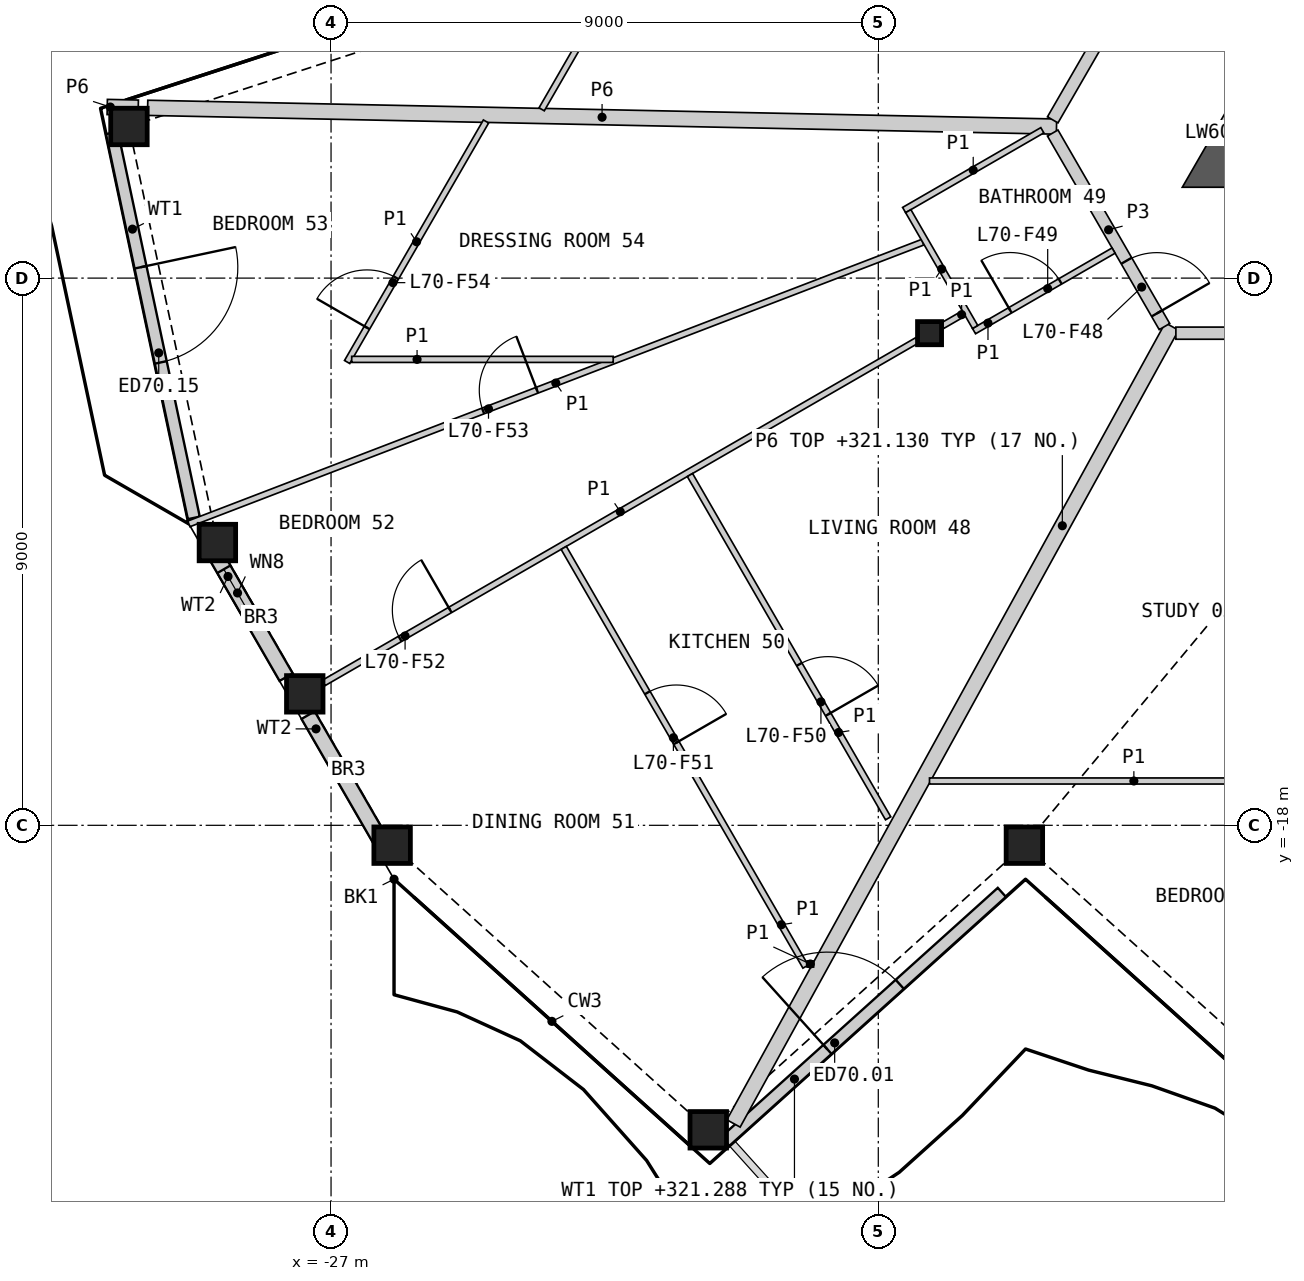
"""IFC4 building model, lengths in metres.
Left out: names, types, materials, properties, quantities, classifications, styles, units other than length and angle.
Written with IfcOpenShell. Run it as: python <this file> out.ifc"""

import sys

from ifc_helpers import new_model, si_unit, direction, frame, frame_2d, origin, origin_2d, place, context, subcontext, project, spatial, polyline, rectangle, hollow_rectangle, i_section, outline, extrude, element, fill, save


model = new_model("IFC4")
c1 = context("Model", 3, precision=1e-05, world=origin(), true_north=direction((0.0, 1.0)))
c2 = subcontext(c1, "Body", "Model", "MODEL_VIEW")
j1 = project(units=[si_unit("LENGTHUNIT", "METRE"), si_unit("PLANEANGLEUNIT", "RADIAN")], contexts=[c1])
p1 = place(None, origin())
s1 = spatial("IfcSite", under=j1, at=p1, CompositionType="ELEMENT")
p2 = place(p1, origin())
s2 = spatial("IfcBuilding", under=s1, at=p2, CompositionType="ELEMENT")
p3 = place(p2, frame((0.0, 0.0, 318.8)))
s3 = spatial("IfcBuildingStorey", under=s2, at=p3, CompositionType="ELEMENT", Elevation=318.8)
for number, where, z_axis, x_axis in (
    (1, (-25.995, -18.327, 0.0), (0.0, 0.0, 1.0), (1.0, 0.0, 0.0)),
    (2, (-20.796, -23.008, 0.0), (0.0, 0.0, 1.0), (1.0, 0.0, 0.0)),
    (3, (-15.597, -18.327, 0.0), (0.0, 0.0, 1.0), (1.0, 0.0, 0.0)),
    (4, (-30.324, -6.506, 0.0), (0.0, 0.0, 1.0), (1.0, 0.0, 0.0)),
    (5, (-28.869, -13.349, 0.0), (0.0, 0.0, 1.0), (1.0, 0.0, 0.0)),
    (6, (-27.432, -15.838, 0.0), (0.0, 0.0, 1.0), (1.0, 0.0, 0.0)),
):
    element("IfcColumn", number, at=place(p3, frame(where, z_axis=z_axis, x_axis=x_axis)), inside=s3, PredefinedType="COLUMN", context=c2, shape_type="SweptSolid", body=[
        extrude(hollow_rectangle(XDim=0.6, YDim=0.6, WallThickness=0.04, at=origin_2d()), origin(), (0.0, 0.0, 1.0), 3.4),
    ])
p4 = place(p3, frame((-17.157, -9.906, 0.0), z_axis=(0.0, 0.0, 1.0), x_axis=(1.0, 0.0, 0.0)))
e7 = element("IfcColumn", 7, at=p4, inside=s3, PredefinedType="COLUMN", context=c2, shape_type="SweptSolid", body=[
    extrude(i_section(OverallWidth=0.396, OverallDepth=0.381, WebThickness=0.019, FlangeThickness=0.03, at=origin_2d()), origin(), (0.0, 0.0, 1.0), 3.4),
])
p5 = place(p3, frame((-20.516, -23.198, 0.0), z_axis=(0.0, 0.0, 1.0), x_axis=(0.743121537674, 0.66915646918, 0.0)))
e8 = element("IfcWall", 8, at=p5, inside=s3, PredefinedType="SOLIDWALL", context=c2, shape_type="SweptSolid", body=[
    extrude(rectangle(XDim=6.12, YDim=0.2, at=frame_2d((3.06, 0.0))), origin(), (0.0, 0.0, 1.0), 2.488),
])
p6 = place(p5, frame((2.26, 0.0, 0.0)))
e9 = element("IfcOpeningElement", 9, at=p6, cuts=e8, PredefinedType="OPENING", context=c2, shape_type="SweptSolid", body=[
    extrude(rectangle(XDim=1.6, YDim=2.25, at=frame_2d((0.8, 1.125))), frame((0.0, 0.11, 0.0), z_axis=(0.0, -1.0, 0.0), x_axis=(1.0, 0.0, 0.0)), (0.0, 0.0, 1.0), 0.22),
])
p7 = place(p3, frame((-30.603, -6.611, 0.0), z_axis=(0.0, 0.0, 1.0), x_axis=(0.207921893309, -0.978145432072, 0.0)))
e10 = element("IfcWall", 10, at=p7, inside=s3, PredefinedType="SOLIDWALL", context=c2, shape_type="SweptSolid", body=[
    extrude(rectangle(XDim=6.475, YDim=0.2, at=frame_2d((3.237, 0.0))), origin(), (0.0, 0.0, 1.0), 2.488),
])
p8 = place(p7, frame((2.26, 0.0, 0.0)))
e11 = element("IfcOpeningElement", 11, at=p8, cuts=e10, PredefinedType="OPENING", context=c2, shape_type="SweptSolid", body=[
    extrude(rectangle(XDim=1.6, YDim=2.25, at=frame_2d((0.8, 1.125))), frame((0.0, 0.11, 0.0), z_axis=(0.0, -1.0, 0.0), x_axis=(1.0, 0.0, 0.0)), (0.0, 0.0, 1.0), 0.22),
])
p9 = place(p3, frame((-29.013, -13.356, 0.0), z_axis=(0.0, 0.0, 1.0), x_axis=(0.500012659481, -0.866018094706, 0.0)))
e12 = element("IfcWall", 12, at=p9, inside=s3, PredefinedType="SOLIDWALL", context=c2, shape_type="SweptSolid", body=[
    extrude(rectangle(XDim=2.549, YDim=0.25, at=frame_2d((1.274, 0.0))), origin(), (0.0, 0.0, 1.0), 2.488),
])
p10 = place(p9, frame((0.5, 0.0, 1.5)))
e13 = element("IfcOpeningElement", 13, at=p10, cuts=e12, PredefinedType="OPENING", context=c2, shape_type="SweptSolid", body=[
    extrude(rectangle(XDim=0.9, YDim=0.7, at=frame_2d((0.45, 0.35))), frame((0.0, 0.135, 0.0), z_axis=(0.0, -1.0, 0.0), x_axis=(1.0, 0.0, 0.0)), (0.0, 0.0, 1.0), 0.27),
])
p11 = place(p3, frame((-27.378, -16.188, 0.0), z_axis=(0.0, 0.0, 1.0), x_axis=(0.499992367345, -0.866029810455, 0.0)))
e14 = element("IfcWall", 14, at=p11, inside=s3, PredefinedType="SOLIDWALL", context=c2, shape_type="SweptSolid", body=[
    extrude(rectangle(XDim=2.61, YDim=0.25, at=frame_2d((1.305, 0.0))), origin(), (0.0, 0.0, 1.0), 2.488),
])
p12 = place(p3, origin())
e15 = element("IfcWall", 15, at=p12, inside=s3, PredefinedType="SHEAR", context=c2, shape_type="SweptSolid", body=[
    extrude(outline(polyline([(-12.48, -6.606), (-11.961, -6.906), (-11.961, -7.506), (-13.0, -7.506), (-12.48, -6.606)])), origin(), (0.0, 0.0, 1.0), 3.1),
])
p13 = place(p3, frame((-10.925, -4.511, 0.0), z_axis=(0.0, 0.0, 1.0), x_axis=(-0.500018667571, -0.866014625789, 0.0)))
e16 = element("IfcWall", 16, at=p13, inside=s3, PredefinedType="SHEAR", context=c2, shape_type="SweptSolid", body=[
    extrude(rectangle(XDim=2.592, YDim=0.6, at=frame_2d((1.296, 0.0))), origin(), (0.0, 0.0, 1.0), 3.1),
])
p14 = place(p13, frame((0.6, 0.0, 0.0)))
e17 = element("IfcOpeningElement", 17, at=p14, cuts=e16, PredefinedType="OPENING", context=c2, shape_type="SweptSolid", body=[
    extrude(rectangle(XDim=1.0, YDim=2.1, at=frame_2d((0.5, 1.05))), frame((0.0, 0.31, 0.0), z_axis=(0.0, -1.0, 0.0), x_axis=(1.0, 0.0, 0.0)), (0.0, 0.0, 1.0), 0.62),
])
p15 = place(p3, frame((-20.381, -22.904, 0.0), z_axis=(0.0, 0.0, 1.0), x_axis=(0.481994550341, 0.876174214093, 0.0)))
e18 = element("IfcWall", 18, at=p15, inside=s3, PredefinedType="PARTITIONING", context=c2, shape_type="SweptSolid", body=[
    extrude(rectangle(XDim=14.96, YDim=0.25, at=frame_2d((7.48, 0.0))), origin(), (0.0, 0.0, 1.0), 2.33),
])
p16 = place(p3, frame((-30.016, -6.199, 0.0), z_axis=(0.0, 0.0, 1.0), x_axis=(0.999786619639, -0.02065708573, 0.0)))
e19 = element("IfcWall", 19, at=p16, inside=s3, PredefinedType="PARTITIONING", context=c2, shape_type="SweptSolid", body=[
    extrude(rectangle(XDim=14.951, YDim=0.25, at=frame_2d((7.475, 0.0))), origin(), (0.0, 0.0, 1.0), 2.33),
])
p17 = place(p3, frame((-13.106, -9.906, 0.0), z_axis=(0.0, 0.0, 1.0), x_axis=(1.0, 0.0, 0.0)))
e20 = element("IfcWall", 20, at=p17, inside=s3, PredefinedType="PARTITIONING", context=c2, shape_type="SweptSolid", body=[
    extrude(rectangle(XDim=4.32, YDim=0.2, at=frame_2d((2.16, 0.0))), origin(), (0.0, 0.0, 1.0), 3.1),
])
p18 = place(p3, frame((-15.131, -6.397, 0.0), z_axis=(0.0, 0.0, 1.0), x_axis=(0.500003406062, 0.866023437285, 0.0)))
e21 = element("IfcWall", 21, at=p18, inside=s3, PredefinedType="PARTITIONING", context=c2, shape_type="SweptSolid", body=[
    extrude(rectangle(XDim=4.288, YDim=0.2, at=frame_2d((2.144, 0.0))), origin(), (0.0, 0.0, 1.0), 3.1),
])
p19 = place(p3, frame((-15.131, -6.614, 0.0), z_axis=(0.0, 0.0, 1.0), x_axis=(0.499967746641, -0.866044024469, 0.0)))
e22 = element("IfcWall", 22, at=p19, inside=s3, PredefinedType="PARTITIONING", context=c2, shape_type="SweptSolid", body=[
    extrude(rectangle(XDim=3.676, YDim=0.2, at=frame_2d((1.838, 0.0))), origin(), (0.0, 0.0, 1.0), 3.1),
])
p20 = place(p19, frame((2.426, 0.0, 0.0)))
e23 = element("IfcOpeningElement", 23, at=p20, cuts=e22, PredefinedType="OPENING", context=c2, shape_type="SweptSolid", body=[
    extrude(rectangle(XDim=1.0, YDim=2.1, at=frame_2d((0.5, 1.05))), frame((0.0, 0.11, 0.0), z_axis=(0.0, -1.0, 0.0), x_axis=(1.0, 0.0, 0.0)), (0.0, 0.0, 1.0), 0.22),
])
p21 = place(p3, frame((-30.681, -6.186, 0.0), z_axis=(0.0, 0.0, 1.0), x_axis=(0.999788216533, -0.020579652135, 0.0)))
e24 = element("IfcWall", 24, at=p21, inside=s3, PredefinedType="PARTITIONING", context=c2, shape_type="SweptSolid", body=[
    extrude(rectangle(XDim=0.51, YDim=0.25, at=frame_2d((0.255, 0.0))), origin(), (0.0, 0.0, 1.0), 2.33),
])
p22 = place(p3, frame((-29.338, -13.042, 0.0), z_axis=(0.0, 0.0, 1.0), x_axis=(0.93358243931, 0.358362705944, 0.0)))
e25 = element("IfcWall", 25, at=p22, inside=s3, PredefinedType="PARTITIONING", context=c2, shape_type="SweptSolid", body=[
    extrude(rectangle(XDim=12.928, YDim=0.1, at=frame_2d((6.464, 0.0))), origin(), (0.0, 0.0, 1.0), 2.33),
])
p23 = place(p22, frame((5.183, 0.0, 0.0)))
e26 = element("IfcOpeningElement", 26, at=p23, cuts=e25, PredefinedType="OPENING", context=c2, shape_type="SweptSolid", body=[
    extrude(rectangle(XDim=0.95, YDim=2.1, at=frame_2d((0.475, 1.05))), frame((0.0, 0.06, 0.0), z_axis=(0.0, -1.0, 0.0), x_axis=(1.0, 0.0, 0.0)), (0.0, 0.0, 1.0), 0.12),
])
p24 = place(p3, frame((-27.122, -15.659, 0.0), z_axis=(0.0, 0.0, 1.0), x_axis=(0.866021046153, 0.500007547564, 0.0)))
e27 = element("IfcWall", 27, at=p24, inside=s3, PredefinedType="PARTITIONING", context=c2, shape_type="SweptSolid", body=[
    extrude(rectangle(XDim=11.267, YDim=0.1, at=frame_2d((5.634, 0.0))), origin(), (0.0, 0.0, 1.0), 2.33),
])
p25 = place(p24, frame((1.452, 0.0, 0.0)))
e28 = element("IfcOpeningElement", 28, at=p25, cuts=e27, PredefinedType="OPENING", context=c2, shape_type="SweptSolid", body=[
    extrude(rectangle(XDim=0.95, YDim=2.1, at=frame_2d((0.475, 1.05))), frame((0.0, 0.06, 0.0), z_axis=(0.0, -1.0, 0.0), x_axis=(1.0, 0.0, 0.0)), (0.0, 0.0, 1.0), 0.12),
])
p26 = place(p3, frame((-23.173, -13.437, 0.0), z_axis=(0.0, 0.0, 1.0), x_axis=(0.500018284498, -0.866014846967, 0.0)))
e29 = element("IfcWall", 29, at=p26, inside=s3, PredefinedType="PARTITIONING", context=c2, shape_type="SweptSolid", body=[
    extrude(rectangle(XDim=7.953, YDim=0.1, at=frame_2d((3.977, 0.0))), origin(), (0.0, 0.0, 1.0), 2.33),
])
p27 = place(p26, frame((2.751, 0.0, 0.0)))
e30 = element("IfcOpeningElement", 30, at=p27, cuts=e29, PredefinedType="OPENING", context=c2, shape_type="SweptSolid", body=[
    extrude(rectangle(XDim=0.95, YDim=2.1, at=frame_2d((0.475, 1.05))), frame((0.0, 0.06, 0.0), z_axis=(0.0, -1.0, 0.0), x_axis=(1.0, 0.0, 0.0)), (0.0, 0.0, 1.0), 0.12),
])
p28 = place(p3, frame((-23.536, -6.224, 0.0), z_axis=(0.0, 0.0, 1.0), x_axis=(0.500002256251, 0.866024101133, 0.0)))
e31 = element("IfcWall", 31, at=p28, inside=s3, PredefinedType="PARTITIONING", context=c2, shape_type="SweptSolid", body=[
    extrude(rectangle(XDim=6.722, YDim=0.1, at=frame_2d((3.361, 0.0))), origin(), (0.0, 0.0, 1.0), 2.33),
])
p29 = place(p28, frame((3.292, 0.0, 0.0)))
e32 = element("IfcOpeningElement", 32, at=p29, cuts=e31, PredefinedType="OPENING", context=c2, shape_type="SweptSolid", body=[
    extrude(rectangle(XDim=0.95, YDim=2.1, at=frame_2d((0.475, 1.05))), frame((0.0, 0.06, 0.0), z_axis=(0.0, -1.0, 0.0), x_axis=(1.0, 0.0, 0.0)), (0.0, 0.0, 1.0), 0.12),
])
p30 = place(p3, frame((-17.158, -17.271, 0.0), z_axis=(0.0, 0.0, 1.0), x_axis=(1.0, 0.0, 0.0)))
e33 = element("IfcWall", 33, at=p30, inside=s3, PredefinedType="PARTITIONING", context=c2, shape_type="SweptSolid", body=[
    extrude(rectangle(XDim=6.722, YDim=0.1, at=frame_2d((3.361, 0.0))), origin(), (0.0, 0.0, 1.0), 2.33),
])
p31 = place(p30, frame((5.015, 0.0, 0.0)))
e34 = element("IfcOpeningElement", 34, at=p31, cuts=e33, PredefinedType="OPENING", context=c2, shape_type="SweptSolid", body=[
    extrude(rectangle(XDim=0.95, YDim=2.1, at=frame_2d((0.475, 1.05))), frame((0.0, 0.06, 0.0), z_axis=(0.0, -1.0, 0.0), x_axis=(1.0, 0.0, 0.0)), (0.0, 0.0, 1.0), 0.12),
])
p32 = place(p3, frame((-21.098, -12.239, 0.0), z_axis=(0.0, 0.0, 1.0), x_axis=(0.499973122483, -0.86604092097, 0.0)))
e35 = element("IfcWall", 35, at=p32, inside=s3, PredefinedType="PARTITIONING", context=c2, shape_type="SweptSolid", body=[
    extrude(rectangle(XDim=6.52, YDim=0.1, at=frame_2d((3.26, 0.0))), origin(), (0.0, 0.0, 1.0), 2.33),
])
p33 = place(p32, frame((3.596, 0.0, 0.0)))
e36 = element("IfcOpeningElement", 36, at=p33, cuts=e35, PredefinedType="OPENING", context=c2, shape_type="SweptSolid", body=[
    extrude(rectangle(XDim=0.95, YDim=2.1, at=frame_2d((0.475, 1.05))), frame((0.0, 0.06, 0.0), z_axis=(0.0, -1.0, 0.0), x_axis=(1.0, 0.0, 0.0)), (0.0, 0.0, 1.0), 0.12),
])
p34 = place(p3, frame((-26.736, -10.38, 0.0), z_axis=(0.0, 0.0, 1.0), x_axis=(0.500024700597, 0.866011142419, 0.0)))
e37 = element("IfcWall", 37, at=p34, inside=s3, PredefinedType="PARTITIONING", context=c2, shape_type="SweptSolid", body=[
    extrude(rectangle(XDim=4.568, YDim=0.1, at=frame_2d((2.284, 0.0))), origin(), (0.0, 0.0, 1.0), 2.33),
])
p35 = place(p34, frame((0.652, 0.0, 0.0)))
e38 = element("IfcOpeningElement", 38, at=p35, cuts=e37, PredefinedType="OPENING", context=c2, shape_type="SweptSolid", body=[
    extrude(rectangle(XDim=0.95, YDim=2.1, at=frame_2d((0.475, 1.05))), frame((0.0, 0.06, 0.0), z_axis=(0.0, -1.0, 0.0), x_axis=(1.0, 0.0, 0.0)), (0.0, 0.0, 1.0), 0.12),
])
p36 = place(p3, frame((-26.66, -10.337, 0.0), z_axis=(0.0, 0.0, 1.0), x_axis=(1.0, 0.0, 0.0)))
e39 = element("IfcWall", 39, at=p36, inside=s3, PredefinedType="PARTITIONING", context=c2, shape_type="SweptSolid", body=[
    extrude(rectangle(XDim=4.301, YDim=0.1, at=frame_2d((2.15, 0.0))), origin(), (0.0, 0.0, 1.0), 2.33),
])
p37 = place(p3, frame((-17.575, -7.881, 0.0), z_axis=(0.0, 0.0, 1.0), x_axis=(0.866013657776, 0.500020344131, 0.0)))
e40 = element("IfcWall", 40, at=p37, inside=s3, PredefinedType="PARTITIONING", context=c2, shape_type="SweptSolid", body=[
    extrude(rectangle(XDim=2.625, YDim=0.1, at=frame_2d((1.312, 0.0))), origin(), (0.0, 0.0, 1.0), 2.33),
])
p38 = place(p3, frame((-16.426, -9.872, 0.0), z_axis=(0.0, 0.0, 1.0), x_axis=(0.866029095148, 0.499993606316, 0.0)))
e41 = element("IfcWall", 41, at=p38, inside=s3, PredefinedType="PARTITIONING", context=c2, shape_type="SweptSolid", body=[
    extrude(rectangle(XDim=2.65, YDim=0.1, at=frame_2d((1.325, 0.0))), origin(), (0.0, 0.0, 1.0), 2.33),
])
p39 = place(p38, frame((0.686, 0.0, 0.0)))
e42 = element("IfcOpeningElement", 42, at=p39, cuts=e41, PredefinedType="OPENING", context=c2, shape_type="SweptSolid", body=[
    extrude(rectangle(XDim=0.95, YDim=2.1, at=frame_2d((0.475, 1.05))), frame((0.0, 0.06, 0.0), z_axis=(0.0, -1.0, 0.0), x_axis=(1.0, 0.0, 0.0)), (0.0, 0.0, 1.0), 0.12),
])
p40 = place(p3, frame((-17.507, -7.899, 0.0), z_axis=(0.0, 0.0, 1.0), x_axis=(0.499946605688, -0.86605622881, 0.0)))
e43 = element("IfcWall", 43, at=p40, inside=s3, PredefinedType="PARTITIONING", context=c2, shape_type="SweptSolid", body=[
    extrude(rectangle(XDim=2.2, YDim=0.1, at=frame_2d((1.1, 0.0))), origin(), (0.0, 0.0, 1.0), 2.33),
])
p41 = place(p3, frame((-16.949, -9.786, 0.0), z_axis=(0.0, 0.0, 1.0), x_axis=(0.866036909293, 0.499980071345, 0.0)))
e44 = element("IfcWall", 44, at=p41, inside=s3, PredefinedType="PARTITIONING", context=c2, shape_type="SweptSolid", body=[
    extrude(rectangle(XDim=0.41, YDim=0.1, at=frame_2d((0.205, 0.0))), origin(), (0.0, 0.0, 1.0), 2.33),
])
p42 = place(p3, frame((-19.171, -20.281, 0.0), z_axis=(0.0, 0.0, 1.0), x_axis=(1.0, 0.0, 0.0)))
e45 = element("IfcWall", 45, at=p42, inside=s3, PredefinedType="PARTITIONING", context=c2, shape_type="SweptSolid", body=[
    extrude(rectangle(XDim=0.108, YDim=0.1, at=frame_2d((0.054, 0.0))), origin(), (0.0, 0.0, 1.0), 2.33),
])
p43 = place(p6, origin())
e46 = element("IfcDoor", 46, at=p43, inside=s3, OperationType="DOUBLE_DOOR_SINGLE_SWING", PredefinedType="DOOR", context=c2, shape_type="SweptSolid", body=[
    extrude(rectangle(XDim=1.6, YDim=2.25, at=frame_2d((0.8, 1.125))), frame((0.0, 0.025, 0.0), z_axis=(0.0, -1.0, 0.0), x_axis=(1.0, 0.0, 0.0)), (0.0, 0.0, 1.0), 0.05),
])
fill(e9, e46)
p44 = place(p8, origin())
e47 = element("IfcDoor", 47, at=p44, inside=s3, OperationType="DOUBLE_DOOR_SINGLE_SWING", PredefinedType="DOOR", context=c2, shape_type="SweptSolid", body=[
    extrude(rectangle(XDim=1.6, YDim=2.25, at=frame_2d((0.8, 1.125))), frame((0.0, 0.025, 0.0), z_axis=(0.0, -1.0, 0.0), x_axis=(1.0, 0.0, 0.0)), (0.0, 0.0, 1.0), 0.05),
])
fill(e11, e47)
p45 = place(p10, origin())
e48 = element("IfcWindow", 48, at=p45, inside=s3, PartitioningType="SINGLE_PANEL", PredefinedType="WINDOW", context=c2, shape_type="SweptSolid", body=[
    extrude(rectangle(XDim=0.9, YDim=0.7, at=frame_2d((0.45, 0.35))), frame((0.0, 0.03, 0.0), z_axis=(0.0, -1.0, 0.0), x_axis=(1.0, 0.0, 0.0)), (0.0, 0.0, 1.0), 0.06),
])
fill(e13, e48)
p46 = place(p20, origin())
e49 = element("IfcDoor", 49, at=p46, inside=s3, OperationType="SINGLE_SWING_RIGHT", PredefinedType="DOOR", context=c2, shape_type="SweptSolid", body=[
    extrude(rectangle(XDim=1.0, YDim=2.1, at=frame_2d((0.5, 1.05))), frame((0.0, 0.025, 0.0), z_axis=(0.0, -1.0, 0.0), x_axis=(1.0, 0.0, 0.0)), (0.0, 0.0, 1.0), 0.05),
])
fill(e23, e49)
p47 = place(p39, origin())
e50 = element("IfcDoor", 50, at=p47, inside=s3, OperationType="SINGLE_SWING_LEFT", PredefinedType="DOOR", context=c2, shape_type="SweptSolid", body=[
    extrude(rectangle(XDim=0.95, YDim=2.1, at=frame_2d((0.475, 1.05))), frame((0.0, 0.025, 0.0), z_axis=(0.0, -1.0, 0.0), x_axis=(1.0, 0.0, 0.0)), (0.0, 0.0, 1.0), 0.05),
])
fill(e42, e50)
p48 = place(p33, origin())
e51 = element("IfcDoor", 51, at=p48, inside=s3, OperationType="SINGLE_SWING_RIGHT", PredefinedType="DOOR", context=c2, shape_type="SweptSolid", body=[
    extrude(rectangle(XDim=0.95, YDim=2.1, at=frame_2d((0.475, 1.05))), frame((0.0, 0.025, 0.0), z_axis=(0.0, -1.0, 0.0), x_axis=(1.0, 0.0, 0.0)), (0.0, 0.0, 1.0), 0.05),
])
fill(e36, e51)
p49 = place(p27, origin())
e52 = element("IfcDoor", 52, at=p49, inside=s3, OperationType="SINGLE_SWING_RIGHT", PredefinedType="DOOR", context=c2, shape_type="SweptSolid", body=[
    extrude(rectangle(XDim=0.95, YDim=2.1, at=frame_2d((0.475, 1.05))), frame((0.0, 0.025, 0.0), z_axis=(0.0, -1.0, 0.0), x_axis=(1.0, 0.0, 0.0)), (0.0, 0.0, 1.0), 0.05),
])
fill(e30, e52)
p50 = place(p25, origin())
e53 = element("IfcDoor", 53, at=p50, inside=s3, OperationType="SINGLE_SWING_RIGHT", PredefinedType="DOOR", context=c2, shape_type="SweptSolid", body=[
    extrude(rectangle(XDim=0.95, YDim=2.1, at=frame_2d((0.475, 1.05))), frame((0.0, 0.025, 0.0), z_axis=(0.0, -1.0, 0.0), x_axis=(1.0, 0.0, 0.0)), (0.0, 0.0, 1.0), 0.05),
])
fill(e28, e53)
p51 = place(p23, origin())
e54 = element("IfcDoor", 54, at=p51, inside=s3, OperationType="SINGLE_SWING_RIGHT", PredefinedType="DOOR", context=c2, shape_type="SweptSolid", body=[
    extrude(rectangle(XDim=0.95, YDim=2.1, at=frame_2d((0.475, 1.05))), frame((0.0, 0.025, 0.0), z_axis=(0.0, -1.0, 0.0), x_axis=(1.0, 0.0, 0.0)), (0.0, 0.0, 1.0), 0.05),
])
fill(e26, e54)
p52 = place(p35, origin())
e55 = element("IfcDoor", 55, at=p52, inside=s3, OperationType="SINGLE_SWING_LEFT", PredefinedType="DOOR", context=c2, shape_type="SweptSolid", body=[
    extrude(rectangle(XDim=0.95, YDim=2.1, at=frame_2d((0.475, 1.05))), frame((0.0, 0.025, 0.0), z_axis=(0.0, -1.0, 0.0), x_axis=(1.0, 0.0, 0.0)), (0.0, 0.0, 1.0), 0.05),
])
fill(e38, e55)
save(model, sys.argv[1])
